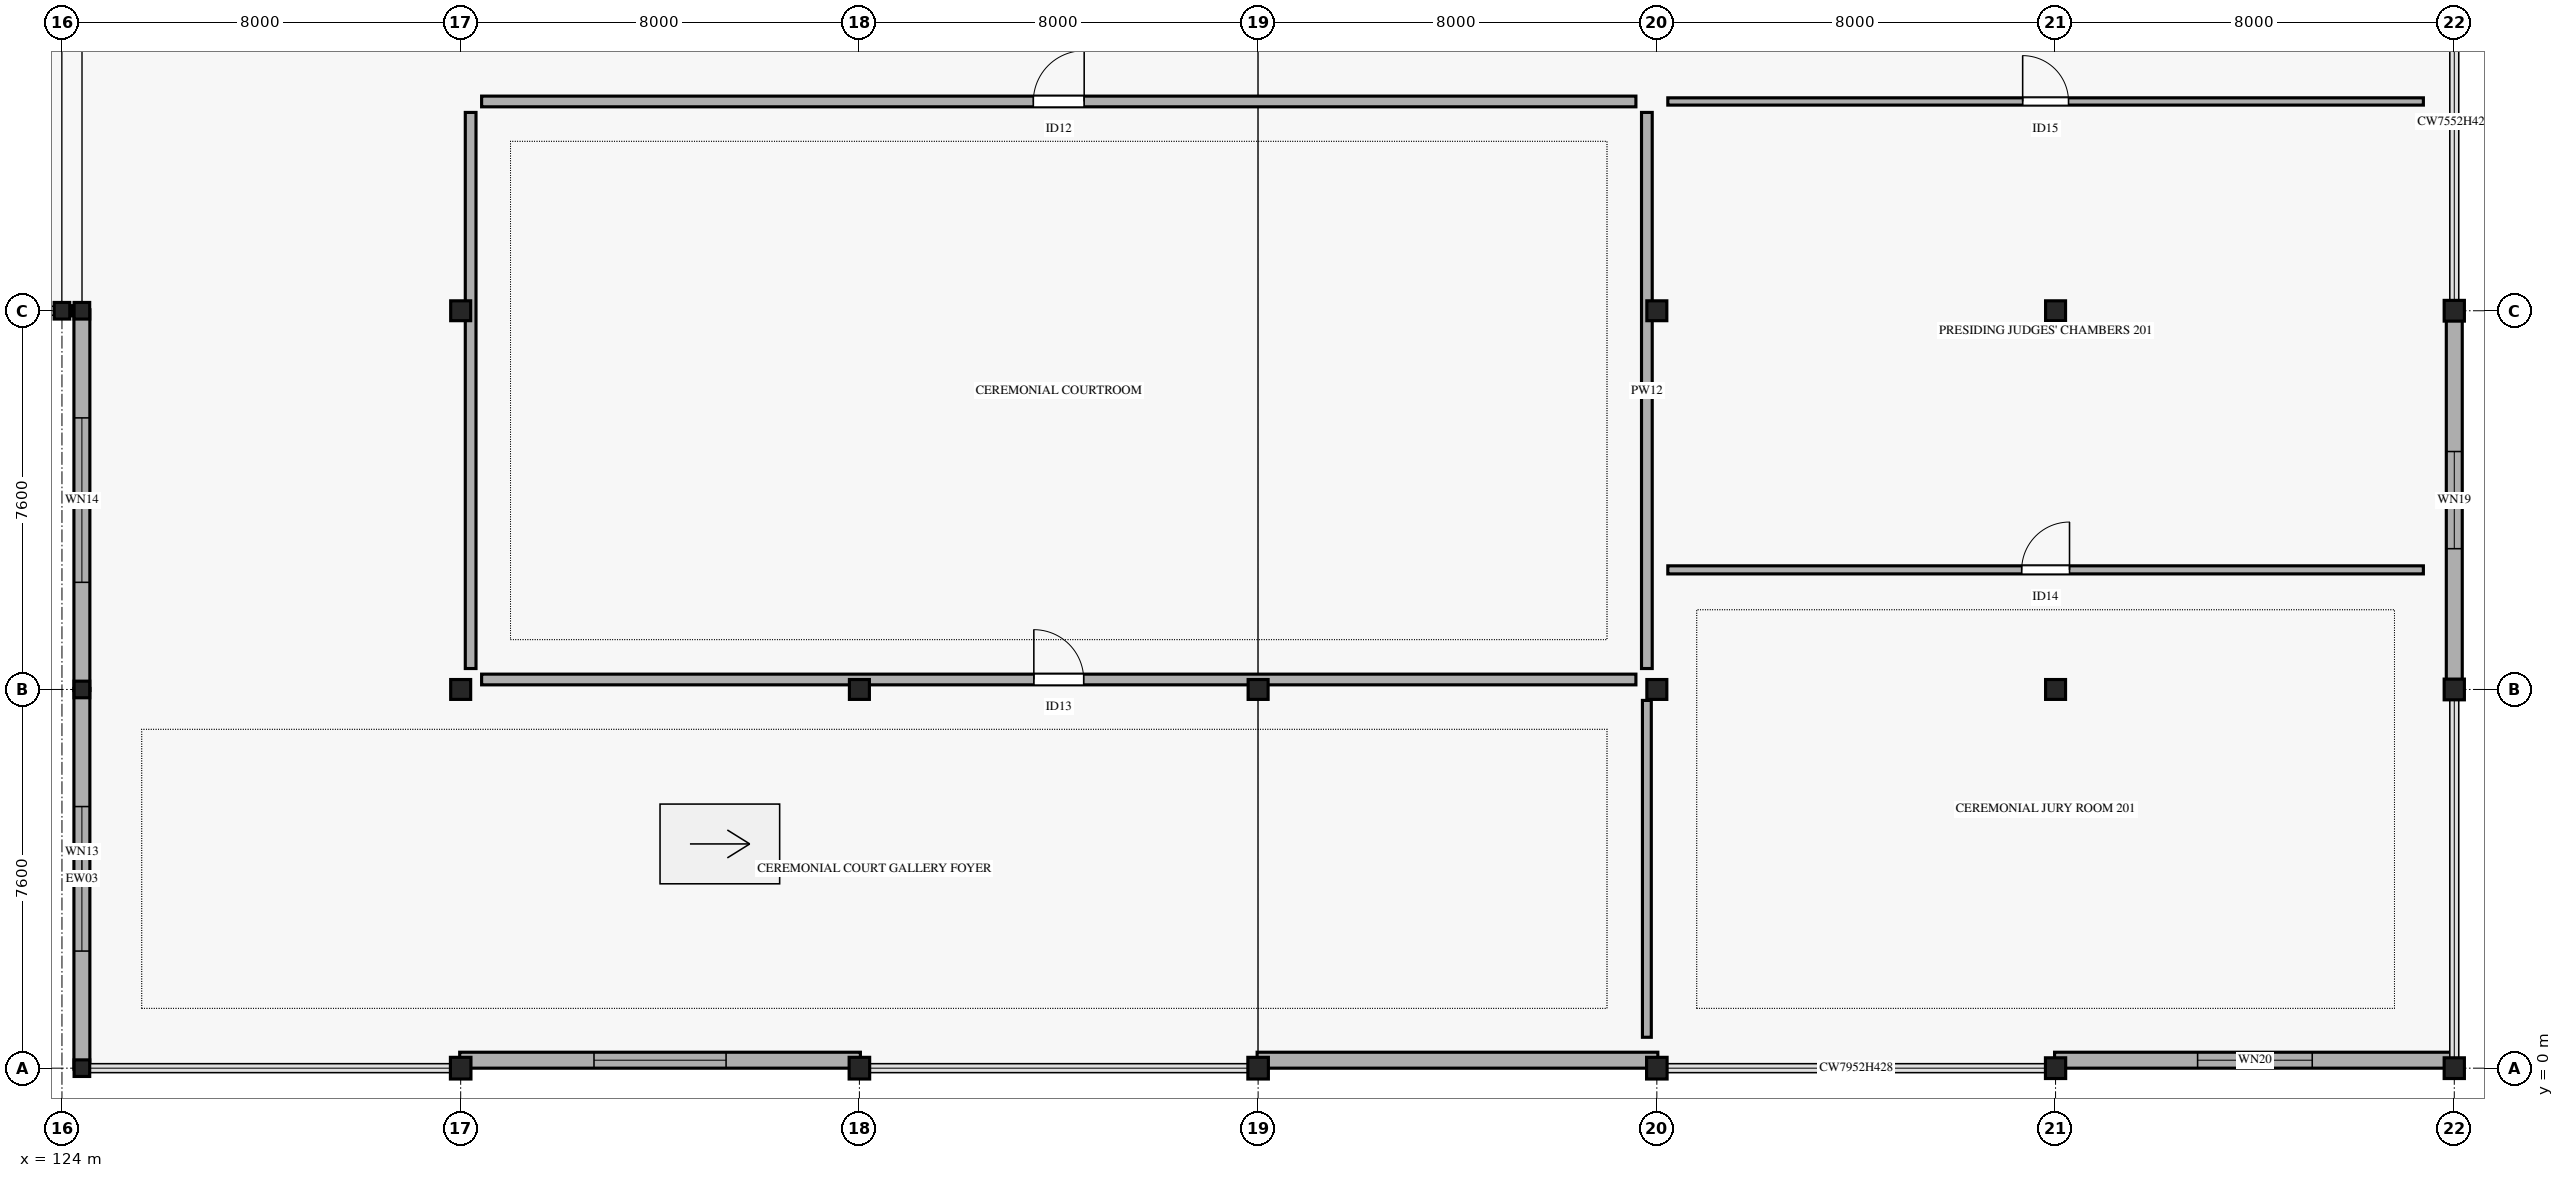
"""IFC4 building model, lengths in metres.
Left out: names, types, materials, properties, quantities, classifications, styles, units other than length and angle.
Written with IfcOpenShell. Run it as: python <this file> out.ifc"""

import sys

from ifc_helpers import new_model, si_unit, direction, frame, frame_2d, origin, origin_2d, place, context, subcontext, project, spatial, rectangle, i_section, extrude, element, fill, save


model = new_model("IFC4")
c1 = context("Model", 3, precision=1e-05, world=origin(), true_north=direction((0.0, 1.0)))
c2 = subcontext(c1, "Body", "Model", "MODEL_VIEW")
j1 = project(units=[si_unit("LENGTHUNIT", "METRE"), si_unit("PLANEANGLEUNIT", "RADIAN")], contexts=[c1])
p1 = place(None, origin())
s1 = spatial("IfcSite", under=j1, at=p1, CompositionType="ELEMENT")
p2 = place(p1, origin())
s2 = spatial("IfcBuilding", under=s1, at=p2, CompositionType="ELEMENT")
p3 = place(p2, frame((0.0, 0.0, 5.4)))
s3 = spatial("IfcBuildingStorey", under=s2, at=p3, CompositionType="ELEMENT", Elevation=5.4)
for number, where, z_axis, x_axis in (
    (1, (124.4, 0.0, 0.0), (0.0, 0.0, 1.0), (1.0, 0.0, 0.0)),
    (2, (124.4, 7.6, 0.0), (0.0, 0.0, 1.0), (1.0, 0.0, 0.0)),
    (3, (124.4, 15.2, 0.0), (0.0, 0.0, 1.0), (1.0, 0.0, 0.0)),
):
    element("IfcColumn", number, at=place(p3, frame(where, z_axis=z_axis, x_axis=x_axis)), inside=s3, PredefinedType="COLUMN", context=c2, shape_type="SweptSolid", body=[
        extrude(i_section(OverallWidth=0.313, OverallDepth=0.333, WebThickness=0.018, FlangeThickness=0.028, FilletRadius=0.015, at=origin_2d()), origin(), (0.0, 0.0, 1.0), 5.185),
    ])
p4 = place(p3, frame((132.0, 0.0, 0.0), z_axis=(0.0, 0.0, 1.0), x_axis=(1.0, 0.0, 0.0)))
e4 = element("IfcColumn", 4, at=p4, inside=s3, PredefinedType="COLUMN", context=c2, shape_type="SweptSolid", body=[
    extrude(i_section(OverallWidth=0.412, OverallDepth=0.435, WebThickness=0.036, FlangeThickness=0.057, FilletRadius=0.015, at=origin_2d()), origin(), (0.0, 0.0, 1.0), 5.185),
])
for number, where, z_axis, x_axis in (
    (5, (132.0, 7.6, 0.0), (0.0, 0.0, 1.0), (1.0, 0.0, 0.0)),
    (6, (132.0, 15.2, 0.0), (0.0, 0.0, 1.0), (1.0, 0.0, 0.0)),
):
    element("IfcColumn", number, at=place(p3, frame(where, z_axis=z_axis, x_axis=x_axis)), inside=s3, PredefinedType="COLUMN", context=c2, shape_type="SweptSolid", body=[
        extrude(i_section(OverallWidth=0.401, OverallDepth=0.399, WebThickness=0.025, FlangeThickness=0.04, FilletRadius=0.015, at=origin_2d()), origin(), (0.0, 0.0, 1.0), 5.185),
    ])
p5 = place(p3, frame((140.0, 0.0, 0.0), z_axis=(0.0, 0.0, 1.0), x_axis=(1.0, 0.0, 0.0)))
e7 = element("IfcColumn", 7, at=p5, inside=s3, PredefinedType="COLUMN", context=c2, shape_type="SweptSolid", body=[
    extrude(i_section(OverallWidth=0.412, OverallDepth=0.435, WebThickness=0.036, FlangeThickness=0.057, FilletRadius=0.015, at=origin_2d()), origin(), (0.0, 0.0, 1.0), 5.185),
])
p6 = place(p3, frame((140.0, 7.6, 0.0), z_axis=(0.0, 0.0, 1.0), x_axis=(1.0, 0.0, 0.0)))
e8 = element("IfcColumn", 8, at=p6, inside=s3, PredefinedType="COLUMN", context=c2, shape_type="SweptSolid", body=[
    extrude(i_section(OverallWidth=0.401, OverallDepth=0.399, WebThickness=0.025, FlangeThickness=0.04, FilletRadius=0.015, at=origin_2d()), origin(), (0.0, 0.0, 1.0), 5.185),
])
p7 = place(p3, frame((148.0, 0.0, 0.0), z_axis=(0.0, 0.0, 1.0), x_axis=(1.0, 0.0, 0.0)))
e9 = element("IfcColumn", 9, at=p7, inside=s3, PredefinedType="COLUMN", context=c2, shape_type="SweptSolid", body=[
    extrude(i_section(OverallWidth=0.412, OverallDepth=0.435, WebThickness=0.036, FlangeThickness=0.057, FilletRadius=0.015, at=origin_2d()), origin(), (0.0, 0.0, 1.0), 5.185),
])
p8 = place(p3, frame((148.0, 7.6, 0.0), z_axis=(0.0, 0.0, 1.0), x_axis=(1.0, 0.0, 0.0)))
e10 = element("IfcColumn", 10, at=p8, inside=s3, PredefinedType="COLUMN", context=c2, shape_type="SweptSolid", body=[
    extrude(i_section(OverallWidth=0.401, OverallDepth=0.399, WebThickness=0.025, FlangeThickness=0.04, FilletRadius=0.015, at=origin_2d()), origin(), (0.0, 0.0, 1.0), 5.185),
])
p9 = place(p3, frame((156.0, 0.0, 0.0), z_axis=(0.0, 0.0, 1.0), x_axis=(1.0, 0.0, 0.0)))
e11 = element("IfcColumn", 11, at=p9, inside=s3, PredefinedType="COLUMN", context=c2, shape_type="SweptSolid", body=[
    extrude(i_section(OverallWidth=0.412, OverallDepth=0.435, WebThickness=0.036, FlangeThickness=0.057, FilletRadius=0.015, at=origin_2d()), origin(), (0.0, 0.0, 1.0), 5.185),
])
for number, where, z_axis, x_axis in (
    (12, (156.0, 7.6, 0.0), (0.0, 0.0, 1.0), (1.0, 0.0, 0.0)),
    (13, (156.0, 15.2, 0.0), (0.0, 0.0, 1.0), (1.0, 0.0, 0.0)),
):
    element("IfcColumn", number, at=place(p3, frame(where, z_axis=z_axis, x_axis=x_axis)), inside=s3, PredefinedType="COLUMN", context=c2, shape_type="SweptSolid", body=[
        extrude(i_section(OverallWidth=0.401, OverallDepth=0.399, WebThickness=0.025, FlangeThickness=0.04, FilletRadius=0.015, at=origin_2d()), origin(), (0.0, 0.0, 1.0), 5.185),
    ])
p10 = place(p3, frame((164.0, 0.0, 0.0), z_axis=(0.0, 0.0, 1.0), x_axis=(1.0, 0.0, 0.0)))
e14 = element("IfcColumn", 14, at=p10, inside=s3, PredefinedType="COLUMN", context=c2, shape_type="SweptSolid", body=[
    extrude(i_section(OverallWidth=0.406, OverallDepth=0.416, WebThickness=0.03, FlangeThickness=0.048, FilletRadius=0.015, at=origin_2d()), origin(), (0.0, 0.0, 1.0), 5.185),
])
for number, where, z_axis, x_axis in (
    (15, (164.0, 7.6, 0.0), (0.0, 0.0, 1.0), (1.0, 0.0, 0.0)),
    (16, (164.0, 15.2, 0.0), (0.0, 0.0, 1.0), (1.0, 0.0, 0.0)),
):
    element("IfcColumn", number, at=place(p3, frame(where, z_axis=z_axis, x_axis=x_axis)), inside=s3, PredefinedType="COLUMN", context=c2, shape_type="SweptSolid", body=[
        extrude(i_section(OverallWidth=0.401, OverallDepth=0.399, WebThickness=0.025, FlangeThickness=0.04, FilletRadius=0.015, at=origin_2d()), origin(), (0.0, 0.0, 1.0), 5.185),
    ])
for number, where, z_axis, x_axis in (
    (17, (172.0, 0.0, 0.0), (0.0, 0.0, 1.0), (1.0, 0.0, 0.0)),
    (18, (172.0, 7.6, 0.0), (0.0, 0.0, 1.0), (1.0, 0.0, 0.0)),
    (19, (172.0, 15.2, 0.0), (0.0, 0.0, 1.0), (1.0, 0.0, 0.0)),
):
    element("IfcColumn", number, at=place(p3, frame(where, z_axis=z_axis, x_axis=x_axis)), inside=s3, PredefinedType="COLUMN", context=c2, shape_type="SweptSolid", body=[
        extrude(i_section(OverallWidth=0.406, OverallDepth=0.416, WebThickness=0.03, FlangeThickness=0.048, FilletRadius=0.015, at=origin_2d()), origin(), (0.0, 0.0, 1.0), 5.185),
    ])
p11 = place(p3, frame((124.0, 15.2, 0.0), z_axis=(0.0, 0.0, 1.0), x_axis=(1.0, 0.0, 0.0)))
e20 = element("IfcColumn", 20, at=p11, inside=s3, PredefinedType="COLUMN", context=c2, shape_type="SweptSolid", body=[
    extrude(i_section(OverallWidth=0.313, OverallDepth=0.333, WebThickness=0.018, FlangeThickness=0.028, FilletRadius=0.015, at=origin_2d()), origin(), (0.0, 0.0, 1.0), 5.185),
])
p12 = place(p3, frame((124.4, -0.02, 0.0), z_axis=(0.0, 0.0, 1.0), x_axis=(0.0, 1.0, 0.0)))
e21 = element("IfcWall", 21, at=p12, inside=s3, PredefinedType="STANDARD", context=c2, shape_type="SweptSolid", body=[
    extrude(rectangle(XDim=7.64, YDim=0.32, at=frame_2d((3.82, 0.0))), origin(), (0.0, 0.0, 1.0), 4.25),
])
p13 = place(p12, frame((2.37, 0.0, 0.75)))
e22 = element("IfcOpeningElement", 22, at=p13, cuts=e21, PredefinedType="OPENING", context=c2, shape_type="SweptSolid", body=[
    extrude(rectangle(XDim=2.9, YDim=2.15, at=frame_2d((1.45, 1.075))), frame((0.0, 0.17, 0.0), z_axis=(0.0, -1.0, 0.0), x_axis=(1.0, 0.0, 0.0)), (0.0, 0.0, 1.0), 0.34),
])
p14 = place(p3, frame((124.4, 7.58, 0.0), z_axis=(0.0, 0.0, 1.0), x_axis=(0.0, 1.0, 0.0)))
e23 = element("IfcWall", 23, at=p14, inside=s3, PredefinedType="STANDARD", context=c2, shape_type="SweptSolid", body=[
    extrude(rectangle(XDim=7.64, YDim=0.32, at=frame_2d((3.82, 0.0))), origin(), (0.0, 0.0, 1.0), 4.25),
])
p15 = place(p14, frame((2.17, 0.0, 0.75)))
e24 = element("IfcOpeningElement", 24, at=p15, cuts=e23, PredefinedType="OPENING", context=c2, shape_type="SweptSolid", body=[
    extrude(rectangle(XDim=3.3, YDim=2.15, at=frame_2d((1.65, 1.075))), frame((0.0, 0.17, 0.0), z_axis=(0.0, -1.0, 0.0), x_axis=(1.0, 0.0, 0.0)), (0.0, 0.0, 1.0), 0.34),
])
p16 = place(p3, frame((172.0, 15.22, 0.0), z_axis=(0.0, 0.0, 1.0), x_axis=(0.0, -1.0, 0.0)))
e25 = element("IfcWall", 25, at=p16, inside=s3, PredefinedType="STANDARD", context=c2, shape_type="SweptSolid", body=[
    extrude(rectangle(XDim=7.64, YDim=0.32, at=frame_2d((3.82, 0.0))), origin(), (0.0, 0.0, 1.0), 4.25),
])
p17 = place(p16, frame((2.845, 0.0, 0.75)))
e26 = element("IfcOpeningElement", 26, at=p17, cuts=e25, PredefinedType="OPENING", context=c2, shape_type="SweptSolid", body=[
    extrude(rectangle(XDim=1.95, YDim=1.8, at=frame_2d((0.975, 0.9))), frame((0.0, 0.17, 0.0), z_axis=(0.0, -1.0, 0.0), x_axis=(1.0, 0.0, 0.0)), (0.0, 0.0, 1.0), 0.34),
])
p18 = place(p3, frame((172.02, 0.16, 0.0), z_axis=(0.0, 0.0, 1.0), x_axis=(-1.0, 0.0, 0.0)))
e27 = element("IfcWall", 27, at=p18, inside=s3, PredefinedType="STANDARD", context=c2, shape_type="SweptSolid", body=[
    extrude(rectangle(XDim=8.04, YDim=0.32, at=frame_2d((4.02, 0.0))), origin(), (0.0, 0.0, 1.0), 4.25),
])
p19 = place(p18, frame((2.87, 0.0, 0.75)))
e28 = element("IfcOpeningElement", 28, at=p19, cuts=e27, PredefinedType="OPENING", context=c2, shape_type="SweptSolid", body=[
    extrude(rectangle(XDim=2.3, YDim=1.8, at=frame_2d((1.15, 0.9))), frame((0.0, 0.17, 0.0), z_axis=(0.0, -1.0, 0.0), x_axis=(1.0, 0.0, 0.0)), (0.0, 0.0, 1.0), 0.34),
])
p20 = place(p3, frame((156.02, 0.16, 0.0), z_axis=(0.0, 0.0, 1.0), x_axis=(-1.0, 0.0, 0.0)))
e29 = element("IfcWall", 29, at=p20, inside=s3, PredefinedType="STANDARD", context=c2, shape_type="SweptSolid", body=[
    extrude(rectangle(XDim=8.04, YDim=0.32, at=frame_2d((4.02, 0.0))), origin(), (0.0, 0.0, 1.0), 4.25),
])
p21 = place(p3, frame((140.02, 0.16, 0.0), z_axis=(0.0, 0.0, 1.0), x_axis=(-1.0, 0.0, 0.0)))
e30 = element("IfcWall", 30, at=p21, inside=s3, PredefinedType="STANDARD", context=c2, shape_type="SweptSolid", body=[
    extrude(rectangle(XDim=8.04, YDim=0.32, at=frame_2d((4.02, 0.0))), origin(), (0.0, 0.0, 1.0), 4.25),
])
p22 = place(p21, frame((2.695, 0.0, 0.75)))
e31 = element("IfcOpeningElement", 31, at=p22, cuts=e30, PredefinedType="OPENING", context=c2, shape_type="SweptSolid", body=[
    extrude(rectangle(XDim=2.65, YDim=1.8, at=frame_2d((1.325, 0.9))), frame((0.0, 0.17, 0.0), z_axis=(0.0, -1.0, 0.0), x_axis=(1.0, 0.0, 0.0)), (0.0, 0.0, 1.0), 0.34),
])
p23 = place(p3, frame((124.22, 15.2, 0.0), z_axis=(0.0, 0.0, 1.0), x_axis=(-1.0, 0.0, 0.0)))
e32 = element("IfcWall", 32, at=p23, inside=s3, PredefinedType="STANDARD", context=c2, shape_type="SweptSolid", body=[
    extrude(rectangle(XDim=0.04, YDim=0.205, at=frame_2d((0.02, 0.0))), origin(), (0.0, 0.0, 1.0), 4.62),
])
p24 = place(p3, frame((132.42, 19.4, 0.0), z_axis=(0.0, 0.0, 1.0), x_axis=(1.0, 0.0, 0.0)))
e33 = element("IfcWall", 33, at=p24, inside=s3, PredefinedType="PARTITIONING", context=c2, shape_type="SweptSolid", body=[
    extrude(rectangle(XDim=23.16, YDim=0.215, at=frame_2d((11.58, 0.0))), origin(), (0.0, 0.0, 1.0), 4.05),
])
p25 = place(p24, frame((11.07, 0.0, 0.0)))
e34 = element("IfcOpeningElement", 34, at=p25, cuts=e33, PredefinedType="OPENING", context=c2, shape_type="SweptSolid", body=[
    extrude(rectangle(XDim=1.02, YDim=2.25, at=frame_2d((0.51, 1.125))), frame((0.0, 0.117, 0.0), z_axis=(0.0, -1.0, 0.0), x_axis=(1.0, 0.0, 0.0)), (0.0, 0.0, 1.0), 0.235),
])
p26 = place(p3, frame((132.42, 7.8, 0.0), z_axis=(0.0, 0.0, 1.0), x_axis=(1.0, 0.0, 0.0)))
e35 = element("IfcWall", 35, at=p26, inside=s3, PredefinedType="PARTITIONING", context=c2, shape_type="SweptSolid", body=[
    extrude(rectangle(XDim=23.16, YDim=0.215, at=frame_2d((11.58, 0.0))), origin(), (0.0, 0.0, 1.0), 4.05),
])
p27 = place(p26, frame((11.08, 0.0, 0.0)))
e36 = element("IfcOpeningElement", 36, at=p27, cuts=e35, PredefinedType="OPENING", context=c2, shape_type="SweptSolid", body=[
    extrude(rectangle(XDim=1.0, YDim=2.3, at=frame_2d((0.5, 1.15))), frame((0.0, 0.117, 0.0), z_axis=(0.0, -1.0, 0.0), x_axis=(1.0, 0.0, 0.0)), (0.0, 0.0, 1.0), 0.235),
])
for number, where, z_axis, x_axis in (
    (37, (155.8, 8.02, 0.0), (0.0, 0.0, 1.0), (0.0, 1.0, 0.0)),
    (38, (132.2, 8.02, 0.0), (0.0, 0.0, 1.0), (0.0, 1.0, 0.0)),
):
    element("IfcWall", number, at=place(p3, frame(where, z_axis=z_axis, x_axis=x_axis)), inside=s3, PredefinedType="PARTITIONING", context=c2, shape_type="SweptSolid", body=[
        extrude(rectangle(XDim=11.16, YDim=0.215, at=frame_2d((5.58, 0.0))), origin(), (0.0, 0.0, 1.0), 4.05),
    ])
p28 = place(p3, frame((155.8, 0.62, 0.0), z_axis=(0.0, 0.0, 1.0), x_axis=(0.0, 1.0, 0.0)))
e39 = element("IfcWall", 39, at=p28, inside=s3, PredefinedType="PARTITIONING", context=c2, shape_type="SweptSolid", body=[
    extrude(rectangle(XDim=6.76, YDim=0.178, at=frame_2d((3.38, 0.0))), origin(), (0.0, 0.0, 1.0), 4.05),
])
p29 = place(p3, frame((156.22, 10.0, 0.0), z_axis=(0.0, 0.0, 1.0), x_axis=(1.0, 0.0, 0.0)))
e40 = element("IfcWall", 40, at=p29, inside=s3, PredefinedType="PARTITIONING", context=c2, shape_type="SweptSolid", body=[
    extrude(rectangle(XDim=15.16, YDim=0.162, at=frame_2d((7.58, 0.0))), origin(), (0.0, 0.0, 1.0), 4.05),
])
p30 = place(p29, frame((7.1, 0.0, 0.0)))
e41 = element("IfcOpeningElement", 41, at=p30, cuts=e40, PredefinedType="OPENING", context=c2, shape_type="SweptSolid", body=[
    extrude(rectangle(XDim=0.96, YDim=2.25, at=frame_2d((0.48, 1.125))), frame((0.0, 0.091, 0.0), z_axis=(0.0, -1.0, 0.0), x_axis=(1.0, 0.0, 0.0)), (0.0, 0.0, 1.0), 0.182),
])
p31 = place(p3, frame((156.22, 19.4, 0.0), z_axis=(0.0, 0.0, 1.0), x_axis=(1.0, 0.0, 0.0)))
e42 = element("IfcWall", 42, at=p31, inside=s3, PredefinedType="PARTITIONING", context=c2, shape_type="SweptSolid", body=[
    extrude(rectangle(XDim=15.16, YDim=0.146, at=frame_2d((7.58, 0.0))), origin(), (0.0, 0.0, 1.0), 4.05),
])
p32 = place(p31, frame((7.12, 0.0, 0.0)))
e43 = element("IfcOpeningElement", 43, at=p32, cuts=e42, PredefinedType="OPENING", context=c2, shape_type="SweptSolid", body=[
    extrude(rectangle(XDim=0.92, YDim=2.2, at=frame_2d((0.46, 1.1))), frame((0.0, 0.083, 0.0), z_axis=(0.0, -1.0, 0.0), x_axis=(1.0, 0.0, 0.0)), (0.0, 0.0, 1.0), 0.166),
])
p33 = place(p13, origin())
e44 = element("IfcWindow", 44, at=p33, inside=s3, PartitioningType="SINGLE_PANEL", PredefinedType="WINDOW", context=c2, shape_type="SweptSolid", body=[
    extrude(rectangle(XDim=2.9, YDim=2.15, at=frame_2d((1.45, 1.075))), frame((0.0, 0.03, 0.0), z_axis=(0.0, -1.0, 0.0), x_axis=(1.0, 0.0, 0.0)), (0.0, 0.0, 1.0), 0.06),
])
fill(e22, e44)
p34 = place(p15, origin())
e45 = element("IfcWindow", 45, at=p34, inside=s3, PartitioningType="SINGLE_PANEL", PredefinedType="WINDOW", context=c2, shape_type="SweptSolid", body=[
    extrude(rectangle(XDim=3.3, YDim=2.15, at=frame_2d((1.65, 1.075))), frame((0.0, 0.03, 0.0), z_axis=(0.0, -1.0, 0.0), x_axis=(1.0, 0.0, 0.0)), (0.0, 0.0, 1.0), 0.06),
])
fill(e24, e45)
p35 = place(p17, origin())
e46 = element("IfcWindow", 46, at=p35, inside=s3, PartitioningType="SINGLE_PANEL", PredefinedType="WINDOW", context=c2, shape_type="SweptSolid", body=[
    extrude(rectangle(XDim=1.95, YDim=1.8, at=frame_2d((0.975, 0.9))), frame((0.0, 0.03, 0.0), z_axis=(0.0, -1.0, 0.0), x_axis=(1.0, 0.0, 0.0)), (0.0, 0.0, 1.0), 0.06),
])
fill(e26, e46)
p36 = place(p19, origin())
e47 = element("IfcWindow", 47, at=p36, inside=s3, PartitioningType="SINGLE_PANEL", PredefinedType="WINDOW", context=c2, shape_type="SweptSolid", body=[
    extrude(rectangle(XDim=2.3, YDim=1.8, at=frame_2d((1.15, 0.9))), frame((0.0, 0.03, 0.0), z_axis=(0.0, -1.0, 0.0), x_axis=(1.0, 0.0, 0.0)), (0.0, 0.0, 1.0), 0.06),
])
fill(e28, e47)
p37 = place(p22, origin())
e48 = element("IfcWindow", 48, at=p37, inside=s3, PartitioningType="SINGLE_PANEL", PredefinedType="WINDOW", context=c2, shape_type="SweptSolid", body=[
    extrude(rectangle(XDim=2.65, YDim=1.8, at=frame_2d((1.325, 0.9))), frame((0.0, 0.03, 0.0), z_axis=(0.0, -1.0, 0.0), x_axis=(1.0, 0.0, 0.0)), (0.0, 0.0, 1.0), 0.06),
])
fill(e31, e48)
p38 = place(p25, origin())
e49 = element("IfcDoor", 49, at=p38, inside=s3, OperationType="SINGLE_SWING_RIGHT", PredefinedType="DOOR", context=c2, shape_type="SweptSolid", body=[
    extrude(rectangle(XDim=1.02, YDim=2.25, at=frame_2d((0.51, 1.125))), frame((0.0, 0.025, 0.0), z_axis=(0.0, -1.0, 0.0), x_axis=(1.0, 0.0, 0.0)), (0.0, 0.0, 1.0), 0.05),
])
fill(e34, e49)
p39 = place(p27, origin())
e50 = element("IfcDoor", 50, at=p39, inside=s3, OperationType="SINGLE_SWING_LEFT", PredefinedType="DOOR", context=c2, shape_type="SweptSolid", body=[
    extrude(rectangle(XDim=1.0, YDim=2.3, at=frame_2d((0.5, 1.15))), frame((0.0, 0.025, 0.0), z_axis=(0.0, -1.0, 0.0), x_axis=(1.0, 0.0, 0.0)), (0.0, 0.0, 1.0), 0.05),
])
fill(e36, e50)
p40 = place(p30, origin())
e51 = element("IfcDoor", 51, at=p40, inside=s3, OperationType="SINGLE_SWING_RIGHT", PredefinedType="DOOR", context=c2, shape_type="SweptSolid", body=[
    extrude(rectangle(XDim=0.96, YDim=2.25, at=frame_2d((0.48, 1.125))), frame((0.0, 0.025, 0.0), z_axis=(0.0, -1.0, 0.0), x_axis=(1.0, 0.0, 0.0)), (0.0, 0.0, 1.0), 0.05),
])
fill(e41, e51)
p41 = place(p32, origin())
e52 = element("IfcDoor", 52, at=p41, inside=s3, OperationType="SINGLE_SWING_LEFT", PredefinedType="DOOR", context=c2, shape_type="SweptSolid", body=[
    extrude(rectangle(XDim=0.92, YDim=2.2, at=frame_2d((0.46, 1.1))), frame((0.0, 0.025, 0.0), z_axis=(0.0, -1.0, 0.0), x_axis=(1.0, 0.0, 0.0)), (0.0, 0.0, 1.0), 0.05),
])
fill(e43, e52)
save(model, sys.argv[1])
